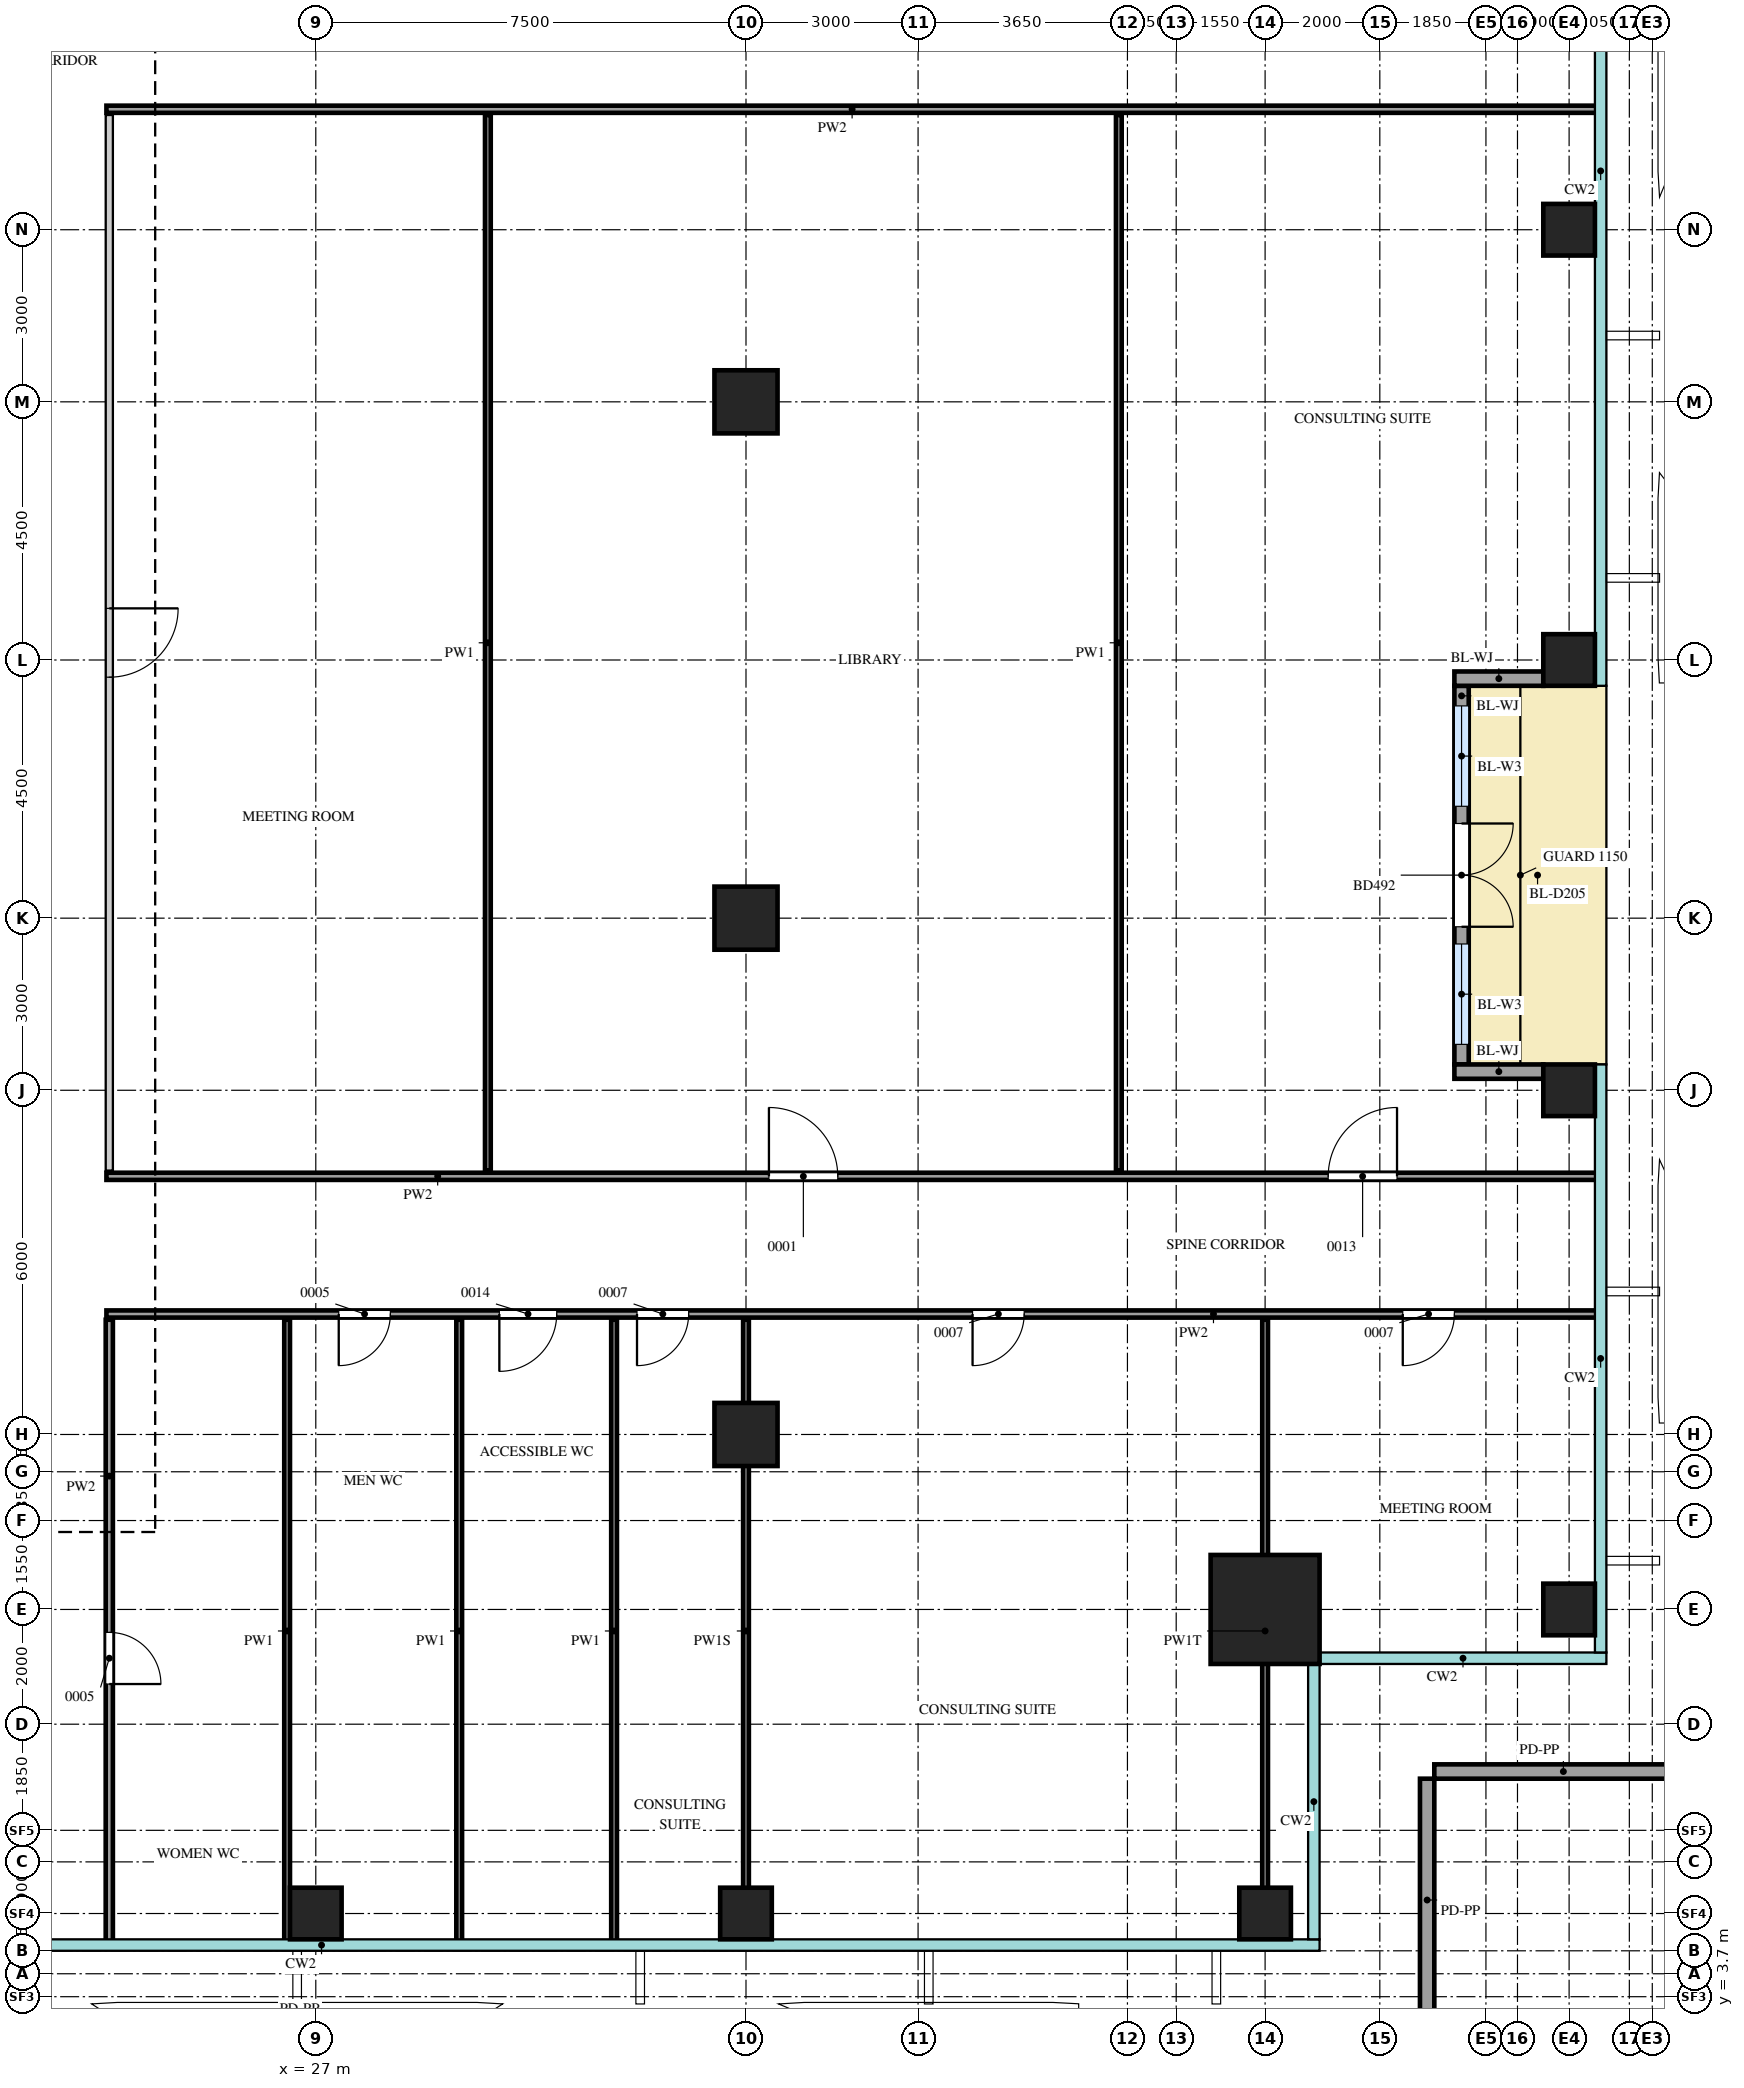
"""IFC4 building model, lengths in metres.
Left out: names, types, materials, properties, quantities, classifications, styles, units other than length and angle.
Written with IfcOpenShell. Run it as: python <this file> out.ifc"""

import sys

from ifc_helpers import new_model, si_unit, direction, frame, frame_2d, origin, origin_2d, place, context, subcontext, project, spatial, rectangle, extrude, source, transform, mapped, element, fill, save


model = new_model("IFC4")
c1 = context("Model", 3, precision=1e-05, world=origin(), true_north=direction((0.0, 1.0)))
c2 = subcontext(c1, "Body", "Model", "MODEL_VIEW")
j1 = project(units=[si_unit("LENGTHUNIT", "METRE"), si_unit("PLANEANGLEUNIT", "RADIAN")], contexts=[c1])
p1 = place(None, origin())
s1 = spatial("IfcSite", under=j1, at=p1, CompositionType="ELEMENT")
p2 = place(p1, origin())
s2 = spatial("IfcBuilding", under=s1, at=p2, CompositionType="ELEMENT")
p3 = place(p2, frame((0.0, 0.0, 222.2)))
s3 = spatial("IfcBuildingStorey", under=s2, at=p3, CompositionType="ELEMENT", Elevation=222.2)
m1 = source(origin(), c2, "Body", "SweptSolid", [
    extrude(rectangle(XDim=1.9, YDim=1.9, at=origin_2d()), origin(), (0.0, 0.0, 1.0), 4.0),
])
p4 = place(p3, frame((43.55, 10.45, 0.0), z_axis=(0.0, 0.0, 1.0), x_axis=(1.0, 0.0, 0.0)))
e1 = element("IfcColumn", 1, at=p4, inside=s3, PredefinedType="COLUMN", context=c2, shape_type="MappedRepresentation", body=[
    mapped(m1, transform((0.0, 0.0, 0.0))),
])
m2 = source(origin(), c2, "Body", "SweptSolid", [
    extrude(rectangle(XDim=0.9, YDim=0.9, at=origin_2d()), origin(), (0.0, 0.0, 1.0), 3.75),
])
for number, where, z_axis, x_axis in (
    (2, (27.0, 5.15, 0.0), (0.0, 0.0, 1.0), (1.0, 0.0, 0.0)),
    (3, (34.5, 5.15, 0.0), (0.0, 0.0, 1.0), (1.0, 0.0, 0.0)),
    (4, (43.55, 5.15, 0.0), (0.0, 0.0, 1.0), (1.0, 0.0, 0.0)),
    (5, (48.85, 10.45, 0.0), (0.0, 0.0, 1.0), (1.0, 0.0, 0.0)),
    (6, (48.85, 19.5, 0.0), (0.0, 0.0, 1.0), (1.0, 0.0, 0.0)),
    (7, (48.85, 27.0, 0.0), (0.0, 0.0, 1.0), (1.0, 0.0, 0.0)),
    (8, (48.85, 34.5, 0.0), (0.0, 0.0, 1.0), (1.0, 0.0, 0.0)),
):
    element("IfcColumn", number, at=place(p3, frame(where, z_axis=z_axis, x_axis=x_axis)), inside=s3, PredefinedType="COLUMN", context=c2, shape_type="MappedRepresentation", body=[
        mapped(m2, transform((0.0, 0.0, 0.0))),
    ])
m3 = source(origin(), c2, "Body", "SweptSolid", [
    extrude(rectangle(XDim=1.1, YDim=1.1, at=origin_2d()), origin(), (0.0, 0.0, 1.0), 3.75),
])
for number, where, z_axis, x_axis in (
    (9, (34.5, 13.5, 0.0), (0.0, 0.0, 1.0), (1.0, 0.0, 0.0)),
    (10, (34.5, 22.5, 0.0), (0.0, 0.0, 1.0), (1.0, 0.0, 0.0)),
    (11, (34.5, 31.5, 0.0), (0.0, 0.0, 1.0), (1.0, 0.0, 0.0)),
):
    element("IfcColumn", number, at=place(p3, frame(where, z_axis=z_axis, x_axis=x_axis)), inside=s3, PredefinedType="COLUMN", context=c2, shape_type="MappedRepresentation", body=[
        mapped(m3, transform((0.0, 0.0, 0.0))),
    ])
m4 = source(origin(), c2, "Body", "SweptSolid", [
    extrude(rectangle(XDim=6.6, YDim=0.25, at=frame_2d((3.3, 0.0))), origin(), (0.0, 0.0, 1.0), 3.2),
])
p5 = place(p3, frame((46.975, 19.95, 0.0), z_axis=(0.0, 0.0, 1.0), x_axis=(0.0, 1.0, 0.0)))
e12 = element("IfcWall", 12, at=p5, inside=s3, PredefinedType="SOLIDWALL", context=c2, shape_type="MappedRepresentation", body=[
    mapped(m4, transform((0.0, 0.0, 0.0))),
])
m5 = source(origin(), c2, "Body", "SweptSolid", [
    extrude(rectangle(XDim=1.75, YDim=2.4, at=frame_2d((0.875, 1.2))), frame((0.0, 0.135, 0.0), z_axis=(0.0, -1.0, 0.0), x_axis=(1.0, 0.0, 0.0)), (0.0, 0.0, 1.0), 0.27),
])
p6 = place(p5, frame((0.35, 0.0, 0.0)))
e13 = element("IfcOpeningElement", 13, at=p6, cuts=e12, PredefinedType="OPENING", context=c2, shape_type="MappedRepresentation", body=[
    mapped(m5, transform((0.0, 0.0, 0.0))),
])
p7 = place(p5, frame((4.5, 0.0, 0.0)))
e14 = element("IfcOpeningElement", 14, at=p7, cuts=e12, PredefinedType="OPENING", context=c2, shape_type="MappedRepresentation", body=[
    mapped(m5, transform((0.0, 0.0, 0.0))),
])
m6 = source(origin(), c2, "Body", "SweptSolid", [
    extrude(rectangle(XDim=1.8, YDim=2.4, at=frame_2d((0.9, 1.2))), frame((0.0, 0.135, 0.0), z_axis=(0.0, -1.0, 0.0), x_axis=(1.0, 0.0, 0.0)), (0.0, 0.0, 1.0), 0.27),
])
p8 = place(p5, frame((2.4, 0.0, 0.0)))
e15 = element("IfcOpeningElement", 15, at=p8, cuts=e12, PredefinedType="OPENING", context=c2, shape_type="MappedRepresentation", body=[
    mapped(m6, transform((0.0, 0.0, 0.0))),
])
m7 = source(origin(), c2, "Body", "SweptSolid", [
    extrude(rectangle(XDim=1.55, YDim=0.25, at=frame_2d((0.775, 0.0))), origin(), (0.0, 0.0, 1.0), 3.2),
])
for number, where, z_axis, x_axis in (
    (16, (48.4, 19.825, 0.0), (0.0, 0.0, 1.0), (-1.0, 0.0, 0.0)),
    (17, (48.4, 26.675, 0.0), (0.0, 0.0, 1.0), (-1.0, 0.0, 0.0)),
):
    element("IfcWall", number, at=place(p3, frame(where, z_axis=z_axis, x_axis=x_axis)), inside=s3, PredefinedType="SOLIDWALL", context=c2, shape_type="MappedRepresentation", body=[
        mapped(m7, transform((0.0, 0.0, 0.0))),
    ])
m8 = source(origin(), c2, "Body", "SweptSolid", [
    extrude(rectangle(XDim=4.23, YDim=0.25, at=frame_2d((2.115, 0.0))), origin(), (0.0, 0.0, 1.0), 1.1),
])
p9 = place(p3, frame((46.375, 3.27, 0.0), z_axis=(0.0, 0.0, 1.0), x_axis=(0.0, 1.0, 0.0)))
e18 = element("IfcWall", 18, at=p9, inside=s3, PredefinedType="SOLIDWALL", context=c2, shape_type="MappedRepresentation", body=[
    mapped(m8, transform((0.0, 0.0, 0.0))),
])
m9 = source(origin(), c2, "Body", "SweptSolid", [
    extrude(rectangle(XDim=4.5, YDim=0.25, at=frame_2d((2.25, 0.0))), origin(), (0.0, 0.0, 1.0), 1.1),
])
p10 = place(p3, frame((46.5, 7.625, 0.0), z_axis=(0.0, 0.0, 1.0), x_axis=(1.0, 0.0, 0.0)))
e19 = element("IfcWall", 19, at=p10, inside=s3, PredefinedType="SOLIDWALL", context=c2, shape_type="MappedRepresentation", body=[
    mapped(m9, transform((0.0, 0.0, 0.0))),
])
m10 = source(origin(), c2, "Body", "SweptSolid", [
    extrude(rectangle(XDim=10.85, YDim=0.125, at=frame_2d((5.425, 0.0))), origin(), (0.0, 0.0, 1.0), 3.8),
])
p11 = place(p3, frame((23.4, 4.65, 0.0), z_axis=(0.0, 0.0, 1.0), x_axis=(0.0, 1.0, 0.0)))
e20 = element("IfcWall", 20, at=p11, inside=s3, PredefinedType="PARTITIONING", context=c2, shape_type="MappedRepresentation", body=[
    mapped(m10, transform((0.0, 0.0, 0.0))),
])
m11 = source(origin(), c2, "Body", "SweptSolid", [
    extrude(rectangle(XDim=0.9, YDim=2.1, at=frame_2d((0.45, 1.05))), frame((0.0, 0.073, 0.0), z_axis=(0.0, -1.0, 0.0), x_axis=(1.0, 0.0, 0.0)), (0.0, 0.0, 1.0), 0.145),
])
p12 = place(p11, frame((4.5, 0.0, 0.0)))
e21 = element("IfcOpeningElement", 21, at=p12, cuts=e20, PredefinedType="OPENING", context=c2, shape_type="MappedRepresentation", body=[
    mapped(m11, transform((0.0, 0.0, 0.0))),
])
m12 = source(origin(), c2, "Body", "SweptSolid", [
    extrude(rectangle(XDim=10.85, YDim=0.1, at=frame_2d((5.425, 0.0))), origin(), (0.0, 0.0, 1.0), 3.8),
])
for number, where, z_axis, x_axis in (
    (22, (26.5, 4.65, 0.0), (0.0, 0.0, 1.0), (0.0, 1.0, 0.0)),
    (23, (29.5, 4.65, 0.0), (0.0, 0.0, 1.0), (0.0, 1.0, 0.0)),
    (24, (32.2, 4.65, 0.0), (0.0, 0.0, 1.0), (0.0, 1.0, 0.0)),
):
    element("IfcWall", number, at=place(p3, frame(where, z_axis=z_axis, x_axis=x_axis)), inside=s3, PredefinedType="PARTITIONING", context=c2, shape_type="MappedRepresentation", body=[
        mapped(m12, transform((0.0, 0.0, 0.0))),
    ])
m13 = source(origin(), c2, "Body", "SweptSolid", [
    extrude(rectangle(XDim=10.85, YDim=0.1, at=frame_2d((5.425, 0.0))), origin(), (0.0, 0.0, 1.0), 3.35),
])
p13 = place(p3, frame((34.5, 4.65, 0.0), z_axis=(0.0, 0.0, 1.0), x_axis=(0.0, 1.0, 0.0)))
e25 = element("IfcWall", 25, at=p13, inside=s3, PredefinedType="PARTITIONING", context=c2, shape_type="MappedRepresentation", body=[
    mapped(m13, transform((0.0, 0.0, 0.0))),
])
m14 = source(origin(), c2, "Body", "SweptSolid", [
    extrude(rectangle(XDim=10.85, YDim=0.1, at=frame_2d((5.425, 0.0))), origin(), (0.0, 0.0, 1.0), 3.3),
])
p14 = place(p3, frame((43.55, 4.65, 0.0), z_axis=(0.0, 0.0, 1.0), x_axis=(0.0, 1.0, 0.0)))
e26 = element("IfcWall", 26, at=p14, inside=s3, PredefinedType="PARTITIONING", context=c2, shape_type="MappedRepresentation", body=[
    mapped(m14, transform((0.0, 0.0, 0.0))),
])
m15 = source(origin(), c2, "Body", "SweptSolid", [
    extrude(rectangle(XDim=26.0, YDim=0.125, at=frame_2d((13.0, 0.0))), origin(), (0.0, 0.0, 1.0), 3.8),
])
p15 = place(p3, frame((23.35, 15.6, 0.0), z_axis=(0.0, 0.0, 1.0), x_axis=(1.0, 0.0, 0.0)))
e27 = element("IfcWall", 27, at=p15, inside=s3, PredefinedType="PARTITIONING", context=c2, shape_type="MappedRepresentation", body=[
    mapped(m15, transform((0.0, 0.0, 0.0))),
])
p16 = place(p15, frame((4.05, 0.0, 0.0)))
e28 = element("IfcOpeningElement", 28, at=p16, cuts=e27, PredefinedType="OPENING", context=c2, shape_type="MappedRepresentation", body=[
    mapped(m11, transform((0.0, 0.0, 0.0))),
])
m16 = source(origin(), c2, "Body", "SweptSolid", [
    extrude(rectangle(XDim=1.0, YDim=2.1, at=frame_2d((0.5, 1.05))), frame((0.0, 0.073, 0.0), z_axis=(0.0, -1.0, 0.0), x_axis=(1.0, 0.0, 0.0)), (0.0, 0.0, 1.0), 0.145),
])
p17 = place(p15, frame((6.85, 0.0, 0.0)))
e29 = element("IfcOpeningElement", 29, at=p17, cuts=e27, PredefinedType="OPENING", context=c2, shape_type="MappedRepresentation", body=[
    mapped(m16, transform((0.0, 0.0, 0.0))),
])
p18 = place(p15, frame((9.25, 0.0, 0.0)))
e30 = element("IfcOpeningElement", 30, at=p18, cuts=e27, PredefinedType="OPENING", context=c2, shape_type="MappedRepresentation", body=[
    mapped(m11, transform((0.0, 0.0, 0.0))),
])
p19 = place(p15, frame((15.1, 0.0, 0.0)))
e31 = element("IfcOpeningElement", 31, at=p19, cuts=e27, PredefinedType="OPENING", context=c2, shape_type="MappedRepresentation", body=[
    mapped(m11, transform((0.0, 0.0, 0.0))),
])
p20 = place(p15, frame((22.6, 0.0, 0.0)))
e32 = element("IfcOpeningElement", 32, at=p20, cuts=e27, PredefinedType="OPENING", context=c2, shape_type="MappedRepresentation", body=[
    mapped(m11, transform((0.0, 0.0, 0.0))),
])
p21 = place(p3, frame((23.35, 18.0, 0.0), z_axis=(0.0, 0.0, 1.0), x_axis=(1.0, 0.0, 0.0)))
e33 = element("IfcWall", 33, at=p21, inside=s3, PredefinedType="PARTITIONING", context=c2, shape_type="MappedRepresentation", body=[
    mapped(m15, transform((0.0, 0.0, 0.0))),
])
m17 = source(origin(), c2, "Body", "SweptSolid", [
    extrude(rectangle(XDim=1.2, YDim=2.1, at=frame_2d((0.6, 1.05))), frame((0.0, 0.073, 0.0), z_axis=(0.0, -1.0, 0.0), x_axis=(1.0, 0.0, 0.0)), (0.0, 0.0, 1.0), 0.145),
])
p22 = place(p21, frame((11.55, 0.0, 0.0)))
e34 = element("IfcOpeningElement", 34, at=p22, cuts=e33, PredefinedType="OPENING", context=c2, shape_type="MappedRepresentation", body=[
    mapped(m17, transform((0.0, 0.0, 0.0))),
])
p23 = place(p21, frame((21.3, 0.0, 0.0)))
e35 = element("IfcOpeningElement", 35, at=p23, cuts=e33, PredefinedType="OPENING", context=c2, shape_type="MappedRepresentation", body=[
    mapped(m17, transform((0.0, 0.0, 0.0))),
])
m18 = source(origin(), c2, "Body", "SweptSolid", [
    extrude(rectangle(XDim=18.4, YDim=0.125, at=frame_2d((9.2, 0.0))), origin(), (0.0, 0.0, 1.0), 3.8),
])
p24 = place(p3, frame((23.4, 18.1, 0.0), z_axis=(0.0, 0.0, 1.0), x_axis=(0.0, 1.0, 0.0)))
e36 = element("IfcWall", 36, at=p24, inside=s3, PredefinedType="PARTITIONING", context=c2, shape_type="MappedRepresentation", body=[
    mapped(m18, transform((0.0, 0.0, 0.0))),
])
p25 = place(p24, frame((8.6, 0.0, 0.0)))
e37 = element("IfcOpeningElement", 37, at=p25, cuts=e36, PredefinedType="OPENING", context=c2, shape_type="MappedRepresentation", body=[
    mapped(m17, transform((0.0, 0.0, 0.0))),
])
m19 = source(origin(), c2, "Body", "SweptSolid", [
    extrude(rectangle(XDim=18.4, YDim=0.1, at=frame_2d((9.2, 0.0))), origin(), (0.0, 0.0, 1.0), 3.8),
])
for number, where, z_axis, x_axis in (
    (38, (30.0, 18.1, 0.0), (0.0, 0.0, 1.0), (0.0, 1.0, 0.0)),
    (39, (41.0, 18.1, 0.0), (0.0, 0.0, 1.0), (0.0, 1.0, 0.0)),
):
    element("IfcWall", number, at=place(p3, frame(where, z_axis=z_axis, x_axis=x_axis)), inside=s3, PredefinedType="PARTITIONING", context=c2, shape_type="MappedRepresentation", body=[
        mapped(m19, transform((0.0, 0.0, 0.0))),
    ])
p26 = place(p3, frame((23.35, 36.6, 0.0), z_axis=(0.0, 0.0, 1.0), x_axis=(1.0, 0.0, 0.0)))
e40 = element("IfcWall", 40, at=p26, inside=s3, PredefinedType="PARTITIONING", context=c2, shape_type="MappedRepresentation", body=[
    mapped(m15, transform((0.0, 0.0, 0.0))),
])
m20 = source(origin(), c2, "Body", "SweptSolid", [
    extrude(rectangle(XDim=1.75, YDim=2.4, at=frame_2d((0.875, 1.2))), frame((0.0, 0.03, 0.0), z_axis=(0.0, -1.0, 0.0), x_axis=(1.0, 0.0, 0.0)), (0.0, 0.0, 1.0), 0.06),
])
p27 = place(p6, origin())
e41 = element("IfcWindow", 41, at=p27, inside=s3, PartitioningType="SINGLE_PANEL", PredefinedType="WINDOW", context=c2, shape_type="MappedRepresentation", body=[
    mapped(m20, transform((0.0, 0.0, 0.0))),
])
fill(e13, e41)
p28 = place(p7, origin())
e42 = element("IfcWindow", 42, at=p28, inside=s3, PartitioningType="SINGLE_PANEL", PredefinedType="WINDOW", context=c2, shape_type="MappedRepresentation", body=[
    mapped(m20, transform((0.0, 0.0, 0.0))),
])
fill(e14, e42)
m21 = source(origin(), c2, "Body", "SweptSolid", [
    extrude(rectangle(XDim=1.8, YDim=2.4, at=frame_2d((0.9, 1.2))), frame((0.0, 0.025, 0.0), z_axis=(0.0, -1.0, 0.0), x_axis=(1.0, 0.0, 0.0)), (0.0, 0.0, 1.0), 0.05),
])
p29 = place(p8, origin())
e43 = element("IfcDoor", 43, at=p29, inside=s3, OperationType="DOUBLE_DOOR_DOUBLE_SWING", PredefinedType="DOOR", context=c2, shape_type="MappedRepresentation", body=[
    mapped(m21, transform((0.0, 0.0, 0.0))),
])
fill(e15, e43)
m22 = source(origin(), c2, "Body", "SweptSolid", [
    extrude(rectangle(XDim=0.9, YDim=2.1, at=frame_2d((0.45, 1.05))), frame((0.0, 0.025, 0.0), z_axis=(0.0, -1.0, 0.0), x_axis=(1.0, 0.0, 0.0)), (0.0, 0.0, 1.0), 0.05),
])
p30 = place(p12, origin())
e44 = element("IfcDoor", 44, at=p30, inside=s3, OperationType="SINGLE_SWING_LEFT", PredefinedType="DOOR", context=c2, shape_type="MappedRepresentation", body=[
    mapped(m22, transform((0.0, 0.0, 0.0))),
])
fill(e21, e44)
p31 = place(p16, origin())
e45 = element("IfcDoor", 45, at=p31, inside=s3, OperationType="SINGLE_SWING_LEFT", PredefinedType="DOOR", context=c2, shape_type="MappedRepresentation", body=[
    mapped(m22, transform((0.0, 0.0, 0.0))),
])
fill(e28, e45)
m23 = source(origin(), c2, "Body", "SweptSolid", [
    extrude(rectangle(XDim=1.0, YDim=2.1, at=frame_2d((0.5, 1.05))), frame((0.0, 0.025, 0.0), z_axis=(0.0, -1.0, 0.0), x_axis=(1.0, 0.0, 0.0)), (0.0, 0.0, 1.0), 0.05),
])
p32 = place(p17, origin())
e46 = element("IfcDoor", 46, at=p32, inside=s3, OperationType="SINGLE_SWING_LEFT", PredefinedType="DOOR", context=c2, shape_type="MappedRepresentation", body=[
    mapped(m23, transform((0.0, 0.0, 0.0))),
])
fill(e29, e46)
p33 = place(p18, origin())
e47 = element("IfcDoor", 47, at=p33, inside=s3, OperationType="SINGLE_SWING_LEFT", PredefinedType="DOOR", context=c2, shape_type="MappedRepresentation", body=[
    mapped(m22, transform((0.0, 0.0, 0.0))),
])
fill(e30, e47)
p34 = place(p19, origin())
e48 = element("IfcDoor", 48, at=p34, inside=s3, OperationType="SINGLE_SWING_LEFT", PredefinedType="DOOR", context=c2, shape_type="MappedRepresentation", body=[
    mapped(m22, transform((0.0, 0.0, 0.0))),
])
fill(e31, e48)
p35 = place(p20, origin())
e49 = element("IfcDoor", 49, at=p35, inside=s3, OperationType="SINGLE_SWING_LEFT", PredefinedType="DOOR", context=c2, shape_type="MappedRepresentation", body=[
    mapped(m22, transform((0.0, 0.0, 0.0))),
])
fill(e32, e49)
m24 = source(origin(), c2, "Body", "SweptSolid", [
    extrude(rectangle(XDim=1.2, YDim=2.1, at=frame_2d((0.6, 1.05))), frame((0.0, 0.025, 0.0), z_axis=(0.0, -1.0, 0.0), x_axis=(1.0, 0.0, 0.0)), (0.0, 0.0, 1.0), 0.05),
])
p36 = place(p25, origin())
e50 = element("IfcDoor", 50, at=p36, inside=s3, OperationType="SINGLE_SWING_RIGHT", PredefinedType="DOOR", context=c2, shape_type="MappedRepresentation", body=[
    mapped(m24, transform((0.0, 0.0, 0.0))),
])
fill(e37, e50)
p37 = place(p22, origin())
e51 = element("IfcDoor", 51, at=p37, inside=s3, OperationType="SINGLE_SWING_RIGHT", PredefinedType="DOOR", context=c2, shape_type="MappedRepresentation", body=[
    mapped(m24, transform((0.0, 0.0, 0.0))),
])
fill(e34, e51)
p38 = place(p23, origin())
e52 = element("IfcDoor", 52, at=p38, inside=s3, OperationType="SINGLE_SWING_LEFT", PredefinedType="DOOR", context=c2, shape_type="MappedRepresentation", body=[
    mapped(m24, transform((0.0, 0.0, 0.0))),
])
fill(e35, e52)
save(model, sys.argv[1])
